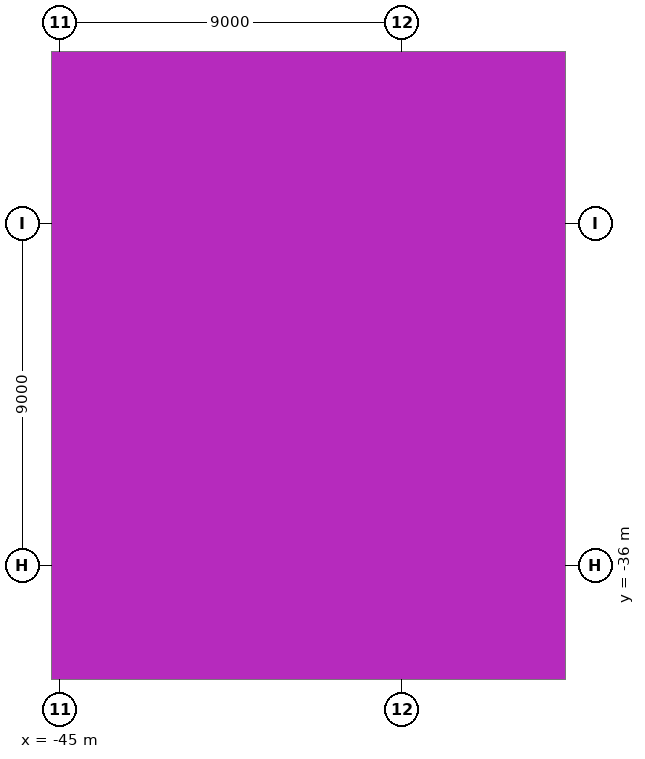
"""IFC4 building model, lengths in metres.
Left out: names, types, materials, properties, quantities, classifications, styles, units other than length and angle.
Written with IfcOpenShell. Run it as: python <this file> out.ifc"""

import sys

from ifc_helpers import new_model, si_unit, direction, frame, origin, origin_2d, place, context, subcontext, project, spatial, rectangle, hollow_rectangle, extrude, element, save


model = new_model("IFC4")
c1 = context("Model", 3, precision=1e-05, world=origin(), true_north=direction((0.0, 1.0)))
c2 = subcontext(c1, "Body", "Model", "MODEL_VIEW")
j1 = project(units=[si_unit("LENGTHUNIT", "METRE"), si_unit("PLANEANGLEUNIT", "RADIAN")], contexts=[c1])
p1 = place(None, origin())
s1 = spatial("IfcSite", under=j1, at=p1, CompositionType="ELEMENT")
p2 = place(p1, origin())
s2 = spatial("IfcBuilding", under=s1, at=p2, CompositionType="ELEMENT")
p3 = place(p2, frame((0.0, 0.0, -4.5)))
s3 = spatial("IfcBuildingStorey", under=s2, at=p3, CompositionType="ELEMENT", Elevation=-4.5)
p4 = place(p3, frame((-45.0, -33.0, 0.0), z_axis=(0.0, 0.0, 1.0), x_axis=(1.0, 0.0, 0.0)))
e1 = element("IfcColumn", 1, at=p4, inside=s3, PredefinedType="COLUMN", context=c2, shape_type="SweptSolid", body=[
    extrude(rectangle(XDim=0.7, YDim=0.7, at=origin_2d()), origin(), (0.0, 0.0, 1.0), 4.0),
])
p5 = place(p3, frame((-30.942, -23.074, 0.0), z_axis=(0.0, 0.0, 1.0), x_axis=(-0.9902681, 0.1391731, 0.0)))
e2 = element("IfcColumn", 2, at=p5, inside=s3, PredefinedType="COLUMN", context=c2, shape_type="SweptSolid", body=[
    extrude(hollow_rectangle(XDim=1.8, YDim=1.8, WallThickness=0.08, at=origin_2d()), origin(), (0.0, 0.0, 1.0), 4.5),
])
save(model, sys.argv[1])
